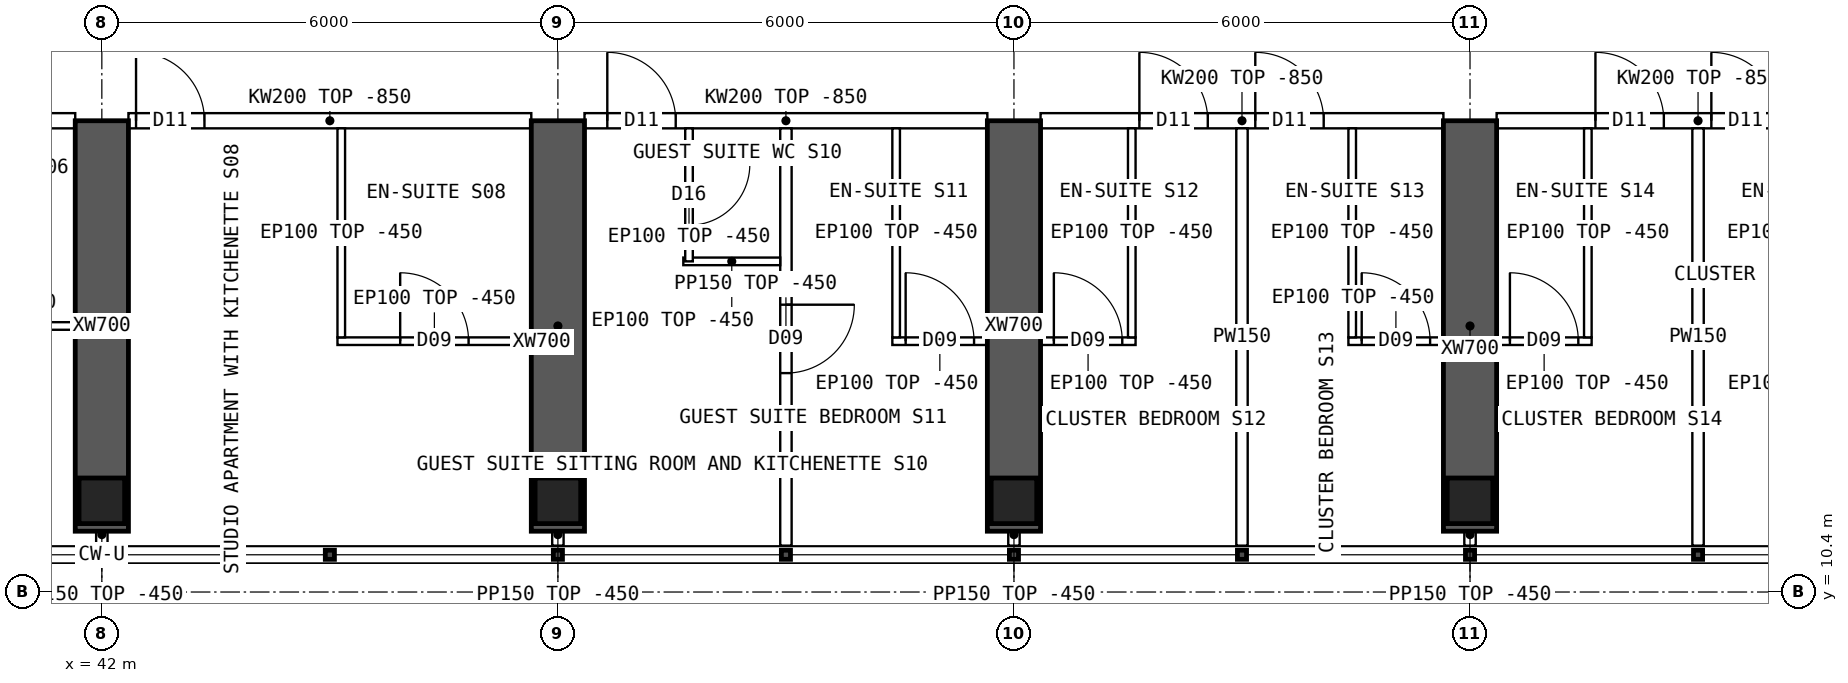
"""IFC4 building model, lengths in metres.
Left out: names, types, materials, properties, quantities, classifications, styles, units other than length and angle.
Written with IfcOpenShell. Run it as: python <this file> out.ifc"""

import sys

from ifc_helpers import new_model, si_unit, direction, frame, frame_2d, origin, origin_2d, place, context, subcontext, project, spatial, polyline, rectangle, hollow_rectangle, outline, extrude, element, fill, save


model = new_model("IFC4")
c1 = context("Model", 3, precision=1e-05, world=origin(), true_north=direction((0.0, 1.0)))
c2 = subcontext(c1, "Body", "Model", "MODEL_VIEW")
j1 = project(units=[si_unit("LENGTHUNIT", "METRE"), si_unit("PLANEANGLEUNIT", "RADIAN")], contexts=[c1])
p1 = place(None, origin())
s1 = spatial("IfcSite", under=j1, at=p1, CompositionType="ELEMENT")
p2 = place(p1, origin())
s2 = spatial("IfcBuilding", under=s1, at=p2, CompositionType="ELEMENT")
p3 = place(p2, frame((0.0, 0.0, 242.8)))
s3 = spatial("IfcBuildingStorey", under=s2, at=p3, CompositionType="ELEMENT", Elevation=242.8)
for number, where, z_axis, x_axis in (
    (1, (42.0, 11.6, 0.0), (0.0, 0.0, 1.0), (1.0, 0.0, 0.0)),
    (2, (48.0, 11.6, 0.0), (0.0, 0.0, 1.0), (1.0, 0.0, 0.0)),
    (3, (54.0, 11.6, 0.0), (0.0, 0.0, 1.0), (1.0, 0.0, 0.0)),
    (4, (60.0, 11.6, 0.0), (0.0, 0.0, 1.0), (1.0, 0.0, 0.0)),
):
    element("IfcColumn", number, at=place(p3, frame(where, z_axis=z_axis, x_axis=x_axis)), inside=s3, PredefinedType="COLUMN", context=c2, shape_type="SweptSolid", body=[
        extrude(hollow_rectangle(XDim=0.6, YDim=0.6, WallThickness=0.06, at=origin_2d()), origin(), (0.0, 0.0, 1.0), 3.75),
    ])
for number, where, z_axis, x_axis in (
    (5, (42.0, 11.2, 0.0), (0.0, 0.0, 1.0), (0.0, 1.0, 0.0)),
    (6, (48.0, 11.2, 0.0), (0.0, 0.0, 1.0), (0.0, 1.0, 0.0)),
    (7, (54.0, 11.2, 0.0), (0.0, 0.0, 1.0), (0.0, 1.0, 0.0)),
    (8, (60.0, 11.2, 0.0), (0.0, 0.0, 1.0), (0.0, 1.0, 0.0)),
):
    element("IfcWall", number, at=place(p3, frame(where, z_axis=z_axis, x_axis=x_axis)), inside=s3, PredefinedType="SHEAR", context=c2, shape_type="SweptSolid", body=[
        extrude(rectangle(XDim=5.4, YDim=0.7, at=frame_2d((2.7, 0.0))), origin(), (0.0, 0.0, 1.0), 3.75),
    ])
p4 = place(p3, frame((36.35, 16.6, 0.0), z_axis=(0.0, 0.0, 1.0), x_axis=(1.0, 0.0, 0.0)))
e9 = element("IfcWall", 9, at=p4, inside=s3, PredefinedType="SOLIDWALL", context=c2, shape_type="SweptSolid", body=[
    extrude(outline(polyline([(0.0, 0.0), (5.3, 0.0), (5.3, 2.9), (0.0, 2.9), (0.0, 0.0)])), frame((0.0, 0.1, 0.0), z_axis=(0.0, -1.0, 0.0), x_axis=(1.0, 0.0, 0.0)), (0.0, 0.0, 1.0), 0.2),
])
p5 = place(p4, frame((0.3, 0.0, 0.0)))
e10 = element("IfcOpeningElement", 10, at=p5, cuts=e9, PredefinedType="OPENING", context=c2, shape_type="SweptSolid", body=[
    extrude(rectangle(XDim=1.0, YDim=2.1, at=frame_2d((0.5, 1.05))), frame((0.0, 0.11, 0.0), z_axis=(0.0, -1.0, 0.0), x_axis=(1.0, 0.0, 0.0)), (0.0, 0.0, 1.0), 0.22),
])
p6 = place(p3, frame((42.35, 16.6, 0.0), z_axis=(0.0, 0.0, 1.0), x_axis=(1.0, 0.0, 0.0)))
e11 = element("IfcWall", 11, at=p6, inside=s3, PredefinedType="SOLIDWALL", context=c2, shape_type="SweptSolid", body=[
    extrude(outline(polyline([(0.0, 0.0), (5.3, 0.0), (5.3, 2.9), (0.0, 2.9), (0.0, 0.0)])), frame((0.0, 0.1, 0.0), z_axis=(0.0, -1.0, 0.0), x_axis=(1.0, 0.0, 0.0)), (0.0, 0.0, 1.0), 0.2),
])
p7 = place(p6, frame((0.1, 0.0, 0.0)))
e12 = element("IfcOpeningElement", 12, at=p7, cuts=e11, PredefinedType="OPENING", context=c2, shape_type="SweptSolid", body=[
    extrude(rectangle(XDim=0.9, YDim=2.1, at=frame_2d((0.45, 1.05))), frame((0.0, 0.11, 0.0), z_axis=(0.0, -1.0, 0.0), x_axis=(1.0, 0.0, 0.0)), (0.0, 0.0, 1.0), 0.22),
])
p8 = place(p3, frame((48.35, 16.6, 0.0), z_axis=(0.0, 0.0, 1.0), x_axis=(1.0, 0.0, 0.0)))
e13 = element("IfcWall", 13, at=p8, inside=s3, PredefinedType="SOLIDWALL", context=c2, shape_type="SweptSolid", body=[
    extrude(outline(polyline([(0.0, 0.0), (5.3, 0.0), (5.3, 2.9), (0.0, 2.9), (0.0, 0.0)])), frame((0.0, 0.1, 0.0), z_axis=(0.0, -1.0, 0.0), x_axis=(1.0, 0.0, 0.0)), (0.0, 0.0, 1.0), 0.2),
])
p9 = place(p8, frame((0.3, 0.0, 0.0)))
e14 = element("IfcOpeningElement", 14, at=p9, cuts=e13, PredefinedType="OPENING", context=c2, shape_type="SweptSolid", body=[
    extrude(rectangle(XDim=0.9, YDim=2.1, at=frame_2d((0.45, 1.05))), frame((0.0, 0.11, 0.0), z_axis=(0.0, -1.0, 0.0), x_axis=(1.0, 0.0, 0.0)), (0.0, 0.0, 1.0), 0.22),
])
p10 = place(p3, frame((54.35, 16.6, 0.0), z_axis=(0.0, 0.0, 1.0), x_axis=(1.0, 0.0, 0.0)))
e15 = element("IfcWall", 15, at=p10, inside=s3, PredefinedType="SOLIDWALL", context=c2, shape_type="SweptSolid", body=[
    extrude(outline(polyline([(0.0, 0.0), (5.3, 0.0), (5.3, 2.9), (0.0, 2.9), (0.0, 0.0)])), frame((0.0, 0.1, 0.0), z_axis=(0.0, -1.0, 0.0), x_axis=(1.0, 0.0, 0.0)), (0.0, 0.0, 1.0), 0.2),
])
p11 = place(p10, frame((1.3, 0.0, 0.0)))
e16 = element("IfcOpeningElement", 16, at=p11, cuts=e15, PredefinedType="OPENING", context=c2, shape_type="SweptSolid", body=[
    extrude(rectangle(XDim=0.9, YDim=2.1, at=frame_2d((0.45, 1.05))), frame((0.0, 0.11, 0.0), z_axis=(0.0, -1.0, 0.0), x_axis=(1.0, 0.0, 0.0)), (0.0, 0.0, 1.0), 0.22),
])
p12 = place(p10, frame((2.825, 0.0, 0.0)))
e17 = element("IfcOpeningElement", 17, at=p12, cuts=e15, PredefinedType="OPENING", context=c2, shape_type="SweptSolid", body=[
    extrude(rectangle(XDim=0.9, YDim=2.1, at=frame_2d((0.45, 1.05))), frame((0.0, 0.11, 0.0), z_axis=(0.0, -1.0, 0.0), x_axis=(1.0, 0.0, 0.0)), (0.0, 0.0, 1.0), 0.22),
])
p13 = place(p3, frame((60.35, 16.6, 0.0), z_axis=(0.0, 0.0, 1.0), x_axis=(1.0, 0.0, 0.0)))
e18 = element("IfcWall", 18, at=p13, inside=s3, PredefinedType="SOLIDWALL", context=c2, shape_type="SweptSolid", body=[
    extrude(outline(polyline([(0.0, 0.0), (5.3, 0.0), (5.3, 2.9), (0.0, 2.9), (0.0, 0.0)])), frame((0.0, 0.1, 0.0), z_axis=(0.0, -1.0, 0.0), x_axis=(1.0, 0.0, 0.0)), (0.0, 0.0, 1.0), 0.2),
])
p14 = place(p13, frame((1.3, 0.0, 0.0)))
e19 = element("IfcOpeningElement", 19, at=p14, cuts=e18, PredefinedType="OPENING", context=c2, shape_type="SweptSolid", body=[
    extrude(rectangle(XDim=0.9, YDim=2.1, at=frame_2d((0.45, 1.05))), frame((0.0, 0.11, 0.0), z_axis=(0.0, -1.0, 0.0), x_axis=(1.0, 0.0, 0.0)), (0.0, 0.0, 1.0), 0.22),
])
p15 = place(p13, frame((2.825, 0.0, 0.0)))
e20 = element("IfcOpeningElement", 20, at=p15, cuts=e18, PredefinedType="OPENING", context=c2, shape_type="SweptSolid", body=[
    extrude(rectangle(XDim=0.9, YDim=2.1, at=frame_2d((0.45, 1.05))), frame((0.0, 0.11, 0.0), z_axis=(0.0, -1.0, 0.0), x_axis=(1.0, 0.0, 0.0)), (0.0, 0.0, 1.0), 0.22),
])
p16 = place(p3, frame((39.0, 13.9, 0.0), z_axis=(0.0, 0.0, 1.0), x_axis=(1.0, 0.0, 0.0)))
e21 = element("IfcWall", 21, at=p16, inside=s3, PredefinedType="PARTITIONING", context=c2, shape_type="SweptSolid", body=[
    extrude(rectangle(XDim=2.65, YDim=0.1, at=frame_2d((1.325, 0.0))), origin(), (0.0, 0.0, 1.0), 3.3),
])
p17 = place(p3, frame((47.65, 13.7, 0.0), z_axis=(0.0, 0.0, 1.0), x_axis=(-1.0, 0.0, 0.0)))
e22 = element("IfcWall", 22, at=p17, inside=s3, PredefinedType="PARTITIONING", context=c2, shape_type="SweptSolid", body=[
    extrude(rectangle(XDim=2.55, YDim=0.1, at=frame_2d((1.275, 0.0))), origin(), (0.0, 0.0, 1.0), 3.3),
])
p18 = place(p17, frame((0.825, 0.0, 0.0)))
e23 = element("IfcOpeningElement", 23, at=p18, cuts=e22, PredefinedType="OPENING", context=c2, shape_type="SweptSolid", body=[
    extrude(rectangle(XDim=0.9, YDim=2.1, at=frame_2d((0.45, 1.05))), frame((0.0, 0.06, 0.0), z_axis=(0.0, -1.0, 0.0), x_axis=(1.0, 0.0, 0.0)), (0.0, 0.0, 1.0), 0.12),
])
p19 = place(p3, frame((45.15, 13.75, 0.0), z_axis=(0.0, 0.0, 1.0), x_axis=(0.0, 1.0, 0.0)))
e24 = element("IfcWall", 24, at=p19, inside=s3, PredefinedType="PARTITIONING", context=c2, shape_type="SweptSolid", body=[
    extrude(outline(polyline([(0.0, 0.0), (2.75, 0.0), (2.75, 2.9), (2.702, 2.9), (2.7, 3.3), (0.0, 3.3), (0.0, 0.0)])), frame((0.0, 0.05, 0.0), z_axis=(0.0, -1.0, 0.0), x_axis=(1.0, 0.0, 0.0)), (0.0, 0.0, 1.0), 0.1),
])
p20 = place(p3, frame((51.0, 11.01, 0.0), z_axis=(0.0, 0.0, 1.0), x_axis=(0.0, 1.0, 0.0)))
e25 = element("IfcWall", 25, at=p20, inside=s3, PredefinedType="PARTITIONING", context=c2, shape_type="SweptSolid", body=[
    extrude(outline(polyline([(0.0, 0.0), (5.49, 0.0), (5.49, 2.9), (5.442, 2.9), (5.44, 3.3), (0.792, 3.3), (0.79, 2.9), (0.392, 2.9), (0.39, 3.3), (0.0, 3.3), (0.0, 0.0)])), frame((0.0, 0.075, 0.0), z_axis=(0.0, -1.0, 0.0), x_axis=(1.0, 0.0, 0.0)), (0.0, 0.0, 1.0), 0.15),
])
p21 = place(p20, frame((2.27, 0.0, 0.0)))
e26 = element("IfcOpeningElement", 26, at=p21, cuts=e25, PredefinedType="OPENING", context=c2, shape_type="SweptSolid", body=[
    extrude(rectangle(XDim=0.9, YDim=2.1, at=frame_2d((0.45, 1.05))), frame((0.0, 0.085, 0.0), z_axis=(0.0, -1.0, 0.0), x_axis=(1.0, 0.0, 0.0)), (0.0, 0.0, 1.0), 0.17),
])
p22 = place(p3, frame((53.65, 13.7, 0.0), z_axis=(0.0, 0.0, 1.0), x_axis=(-1.0, 0.0, 0.0)))
e27 = element("IfcWall", 27, at=p22, inside=s3, PredefinedType="PARTITIONING", context=c2, shape_type="SweptSolid", body=[
    extrude(rectangle(XDim=1.25, YDim=0.1, at=frame_2d((0.625, 0.0))), origin(), (0.0, 0.0, 1.0), 3.3),
])
p23 = place(p22, frame((0.175, 0.0, 0.0)))
e28 = element("IfcOpeningElement", 28, at=p23, cuts=e27, PredefinedType="OPENING", context=c2, shape_type="SweptSolid", body=[
    extrude(rectangle(XDim=0.9, YDim=2.1, at=frame_2d((0.45, 1.05))), frame((0.0, 0.06, 0.0), z_axis=(0.0, -1.0, 0.0), x_axis=(1.0, 0.0, 0.0)), (0.0, 0.0, 1.0), 0.12),
])
p24 = place(p3, frame((52.45, 13.75, 0.0), z_axis=(0.0, 0.0, 1.0), x_axis=(0.0, 1.0, 0.0)))
e29 = element("IfcWall", 29, at=p24, inside=s3, PredefinedType="PARTITIONING", context=c2, shape_type="SweptSolid", body=[
    extrude(outline(polyline([(0.0, 0.0), (2.75, 0.0), (2.75, 2.9), (2.702, 2.9), (2.7, 3.3), (0.0, 3.3), (0.0, 0.0)])), frame((0.0, 0.05, 0.0), z_axis=(0.0, -1.0, 0.0), x_axis=(1.0, 0.0, 0.0)), (0.0, 0.0, 1.0), 0.1),
])
p25 = place(p3, frame((49.65, 14.75, 0.0), z_axis=(0.0, 0.0, 1.0), x_axis=(1.0, 0.0, 0.0)))
e30 = element("IfcWall", 30, at=p25, inside=s3, PredefinedType="PARTITIONING", context=c2, shape_type="SweptSolid", body=[
    extrude(rectangle(XDim=1.275, YDim=0.1, at=frame_2d((0.638, 0.0))), origin(), (0.0, 0.0, 1.0), 3.3),
])
p26 = place(p3, frame((49.725, 14.75, 0.0), z_axis=(0.0, 0.0, 1.0), x_axis=(0.0, 1.0, 0.0)))
e31 = element("IfcWall", 31, at=p26, inside=s3, PredefinedType="PARTITIONING", context=c2, shape_type="SweptSolid", body=[
    extrude(outline(polyline([(0.0, 0.0), (1.75, 0.0), (1.75, 2.9), (1.702, 2.9), (1.7, 3.3), (0.0, 3.3), (0.0, 0.0)])), frame((0.0, 0.05, 0.0), z_axis=(0.0, -1.0, 0.0), x_axis=(1.0, 0.0, 0.0)), (0.0, 0.0, 1.0), 0.1),
])
p27 = place(p26, frame((0.475, 0.0, 0.0)))
e32 = element("IfcOpeningElement", 32, at=p27, cuts=e31, PredefinedType="OPENING", context=c2, shape_type="SweptSolid", body=[
    extrude(rectangle(XDim=0.8, YDim=2.1, at=frame_2d((0.4, 1.05))), frame((0.0, 0.06, 0.0), z_axis=(0.0, -1.0, 0.0), x_axis=(1.0, 0.0, 0.0)), (0.0, 0.0, 1.0), 0.12),
])
p28 = place(p3, frame((57.0, 11.01, 0.0), z_axis=(0.0, 0.0, 1.0), x_axis=(0.0, 1.0, 0.0)))
e33 = element("IfcWall", 33, at=p28, inside=s3, PredefinedType="PARTITIONING", context=c2, shape_type="SweptSolid", body=[
    extrude(outline(polyline([(0.0, 0.0), (5.49, 0.0), (5.49, 2.9), (5.442, 2.9), (5.44, 3.3), (0.792, 3.3), (0.79, 2.9), (0.392, 2.9), (0.39, 3.3), (0.0, 3.3), (0.0, 0.0)])), frame((0.0, 0.075, 0.0), z_axis=(0.0, -1.0, 0.0), x_axis=(1.0, 0.0, 0.0)), (0.0, 0.0, 1.0), 0.15),
])
p29 = place(p3, frame((55.6, 13.7, 0.0), z_axis=(0.0, 0.0, 1.0), x_axis=(-1.0, 0.0, 0.0)))
e34 = element("IfcWall", 34, at=p29, inside=s3, PredefinedType="PARTITIONING", context=c2, shape_type="SweptSolid", body=[
    extrude(rectangle(XDim=1.25, YDim=0.1, at=frame_2d((0.625, 0.0))), origin(), (0.0, 0.0, 1.0), 3.3),
])
p30 = place(p29, frame((0.175, 0.0, 0.0)))
e35 = element("IfcOpeningElement", 35, at=p30, cuts=e34, PredefinedType="OPENING", context=c2, shape_type="SweptSolid", body=[
    extrude(rectangle(XDim=0.9, YDim=2.1, at=frame_2d((0.45, 1.05))), frame((0.0, 0.06, 0.0), z_axis=(0.0, -1.0, 0.0), x_axis=(1.0, 0.0, 0.0)), (0.0, 0.0, 1.0), 0.12),
])
p31 = place(p3, frame((55.55, 13.75, 0.0), z_axis=(0.0, 0.0, 1.0), x_axis=(0.0, 1.0, 0.0)))
e36 = element("IfcWall", 36, at=p31, inside=s3, PredefinedType="PARTITIONING", context=c2, shape_type="SweptSolid", body=[
    extrude(outline(polyline([(0.0, 0.0), (2.75, 0.0), (2.75, 2.9), (2.702, 2.9), (2.7, 3.3), (0.0, 3.3), (0.0, 0.0)])), frame((0.0, 0.05, 0.0), z_axis=(0.0, -1.0, 0.0), x_axis=(1.0, 0.0, 0.0)), (0.0, 0.0, 1.0), 0.1),
])
p32 = place(p3, frame((59.65, 13.7, 0.0), z_axis=(0.0, 0.0, 1.0), x_axis=(-1.0, 0.0, 0.0)))
e37 = element("IfcWall", 37, at=p32, inside=s3, PredefinedType="PARTITIONING", context=c2, shape_type="SweptSolid", body=[
    extrude(rectangle(XDim=1.25, YDim=0.1, at=frame_2d((0.625, 0.0))), origin(), (0.0, 0.0, 1.0), 3.3),
])
p33 = place(p32, frame((0.175, 0.0, 0.0)))
e38 = element("IfcOpeningElement", 38, at=p33, cuts=e37, PredefinedType="OPENING", context=c2, shape_type="SweptSolid", body=[
    extrude(rectangle(XDim=0.9, YDim=2.1, at=frame_2d((0.45, 1.05))), frame((0.0, 0.06, 0.0), z_axis=(0.0, -1.0, 0.0), x_axis=(1.0, 0.0, 0.0)), (0.0, 0.0, 1.0), 0.12),
])
p34 = place(p3, frame((58.45, 13.75, 0.0), z_axis=(0.0, 0.0, 1.0), x_axis=(0.0, 1.0, 0.0)))
e39 = element("IfcWall", 39, at=p34, inside=s3, PredefinedType="PARTITIONING", context=c2, shape_type="SweptSolid", body=[
    extrude(outline(polyline([(0.0, 0.0), (2.75, 0.0), (2.75, 2.9), (2.702, 2.9), (2.7, 3.3), (0.0, 3.3), (0.0, 0.0)])), frame((0.0, 0.05, 0.0), z_axis=(0.0, -1.0, 0.0), x_axis=(1.0, 0.0, 0.0)), (0.0, 0.0, 1.0), 0.1),
])
p35 = place(p3, frame((63.0, 11.01, 0.0), z_axis=(0.0, 0.0, 1.0), x_axis=(0.0, 1.0, 0.0)))
e40 = element("IfcWall", 40, at=p35, inside=s3, PredefinedType="PARTITIONING", context=c2, shape_type="SweptSolid", body=[
    extrude(outline(polyline([(0.0, 0.0), (5.49, 0.0), (5.49, 2.9), (5.442, 2.9), (5.44, 3.3), (0.792, 3.3), (0.79, 2.9), (0.392, 2.9), (0.39, 3.3), (0.0, 3.3), (0.0, 0.0)])), frame((0.0, 0.075, 0.0), z_axis=(0.0, -1.0, 0.0), x_axis=(1.0, 0.0, 0.0)), (0.0, 0.0, 1.0), 0.15),
])
p36 = place(p3, frame((61.6, 13.7, 0.0), z_axis=(0.0, 0.0, 1.0), x_axis=(-1.0, 0.0, 0.0)))
e41 = element("IfcWall", 41, at=p36, inside=s3, PredefinedType="PARTITIONING", context=c2, shape_type="SweptSolid", body=[
    extrude(rectangle(XDim=1.25, YDim=0.1, at=frame_2d((0.625, 0.0))), origin(), (0.0, 0.0, 1.0), 3.3),
])
p37 = place(p36, frame((0.175, 0.0, 0.0)))
e42 = element("IfcOpeningElement", 42, at=p37, cuts=e41, PredefinedType="OPENING", context=c2, shape_type="SweptSolid", body=[
    extrude(rectangle(XDim=0.9, YDim=2.1, at=frame_2d((0.45, 1.05))), frame((0.0, 0.06, 0.0), z_axis=(0.0, -1.0, 0.0), x_axis=(1.0, 0.0, 0.0)), (0.0, 0.0, 1.0), 0.12),
])
p38 = place(p3, frame((61.55, 13.75, 0.0), z_axis=(0.0, 0.0, 1.0), x_axis=(0.0, 1.0, 0.0)))
e43 = element("IfcWall", 43, at=p38, inside=s3, PredefinedType="PARTITIONING", context=c2, shape_type="SweptSolid", body=[
    extrude(outline(polyline([(0.0, 0.0), (2.75, 0.0), (2.75, 2.9), (2.702, 2.9), (2.7, 3.3), (0.0, 3.3), (0.0, 0.0)])), frame((0.0, 0.05, 0.0), z_axis=(0.0, -1.0, 0.0), x_axis=(1.0, 0.0, 0.0)), (0.0, 0.0, 1.0), 0.1),
])
for number, where, z_axis, x_axis in (
    (44, (42.0, 11.3, 0.0), (0.0, 0.0, 1.0), (0.0, -1.0, 0.0)),
    (45, (48.0, 11.3, 0.0), (0.0, 0.0, 1.0), (0.0, -1.0, 0.0)),
    (46, (54.0, 11.3, 0.0), (0.0, 0.0, 1.0), (0.0, -1.0, 0.0)),
    (47, (60.0, 11.3, 0.0), (0.0, 0.0, 1.0), (0.0, -1.0, 0.0)),
):
    element("IfcWall", number, at=place(p3, frame(where, z_axis=z_axis, x_axis=x_axis)), inside=s3, PredefinedType="PARTITIONING", context=c2, shape_type="SweptSolid", body=[
        extrude(rectangle(XDim=0.29, YDim=0.15, at=frame_2d((0.145, 0.0))), origin(), (0.0, 0.0, 1.0), 3.3),
    ])
p39 = place(p18, origin())
e48 = element("IfcDoor", 48, at=p39, inside=s3, OperationType="SINGLE_SWING_RIGHT", PredefinedType="DOOR", context=c2, shape_type="SweptSolid", body=[
    extrude(rectangle(XDim=0.9, YDim=2.1, at=frame_2d((0.45, 1.05))), frame((0.0, 0.025, 0.0), z_axis=(0.0, -1.0, 0.0), x_axis=(1.0, 0.0, 0.0)), (0.0, 0.0, 1.0), 0.05),
])
fill(e23, e48)
p40 = place(p7, origin())
e49 = element("IfcDoor", 49, at=p40, inside=s3, OperationType="SINGLE_SWING_LEFT", PredefinedType="DOOR", context=c2, shape_type="SweptSolid", body=[
    extrude(rectangle(XDim=0.9, YDim=2.1, at=frame_2d((0.45, 1.05))), frame((0.0, 0.025, 0.0), z_axis=(0.0, -1.0, 0.0), x_axis=(1.0, 0.0, 0.0)), (0.0, 0.0, 1.0), 0.05),
])
fill(e12, e49)
p41 = place(p9, origin())
e50 = element("IfcDoor", 50, at=p41, inside=s3, OperationType="SINGLE_SWING_LEFT", PredefinedType="DOOR", context=c2, shape_type="SweptSolid", body=[
    extrude(rectangle(XDim=0.9, YDim=2.1, at=frame_2d((0.45, 1.05))), frame((0.0, 0.025, 0.0), z_axis=(0.0, -1.0, 0.0), x_axis=(1.0, 0.0, 0.0)), (0.0, 0.0, 1.0), 0.05),
])
fill(e14, e50)
p42 = place(p23, origin())
e51 = element("IfcDoor", 51, at=p42, inside=s3, OperationType="SINGLE_SWING_RIGHT", PredefinedType="DOOR", context=c2, shape_type="SweptSolid", body=[
    extrude(rectangle(XDim=0.9, YDim=2.1, at=frame_2d((0.45, 1.05))), frame((0.0, 0.025, 0.0), z_axis=(0.0, -1.0, 0.0), x_axis=(1.0, 0.0, 0.0)), (0.0, 0.0, 1.0), 0.05),
])
fill(e28, e51)
p43 = place(p21, origin())
e52 = element("IfcDoor", 52, at=p43, inside=s3, OperationType="SINGLE_SWING_RIGHT", PredefinedType="DOOR", context=c2, shape_type="SweptSolid", body=[
    extrude(rectangle(XDim=0.9, YDim=2.1, at=frame_2d((0.45, 1.05))), frame((0.0, 0.025, 0.0), z_axis=(0.0, -1.0, 0.0), x_axis=(1.0, 0.0, 0.0)), (0.0, 0.0, 1.0), 0.05),
])
fill(e26, e52)
p44 = place(p27, origin())
e53 = element("IfcDoor", 53, at=p44, inside=s3, OperationType="SINGLE_SWING_RIGHT", PredefinedType="DOOR", context=c2, shape_type="SweptSolid", body=[
    extrude(rectangle(XDim=0.8, YDim=2.1, at=frame_2d((0.4, 1.05))), frame((0.0, 0.025, 0.0), z_axis=(0.0, -1.0, 0.0), x_axis=(1.0, 0.0, 0.0)), (0.0, 0.0, 1.0), 0.05),
])
fill(e32, e53)
p45 = place(p30, origin())
e54 = element("IfcDoor", 54, at=p45, inside=s3, OperationType="SINGLE_SWING_RIGHT", PredefinedType="DOOR", context=c2, shape_type="SweptSolid", body=[
    extrude(rectangle(XDim=0.9, YDim=2.1, at=frame_2d((0.45, 1.05))), frame((0.0, 0.025, 0.0), z_axis=(0.0, -1.0, 0.0), x_axis=(1.0, 0.0, 0.0)), (0.0, 0.0, 1.0), 0.05),
])
fill(e35, e54)
p46 = place(p11, origin())
e55 = element("IfcDoor", 55, at=p46, inside=s3, OperationType="SINGLE_SWING_LEFT", PredefinedType="DOOR", context=c2, shape_type="SweptSolid", body=[
    extrude(rectangle(XDim=0.9, YDim=2.1, at=frame_2d((0.45, 1.05))), frame((0.0, 0.025, 0.0), z_axis=(0.0, -1.0, 0.0), x_axis=(1.0, 0.0, 0.0)), (0.0, 0.0, 1.0), 0.05),
])
fill(e16, e55)
p47 = place(p33, origin())
e56 = element("IfcDoor", 56, at=p47, inside=s3, OperationType="SINGLE_SWING_RIGHT", PredefinedType="DOOR", context=c2, shape_type="SweptSolid", body=[
    extrude(rectangle(XDim=0.9, YDim=2.1, at=frame_2d((0.45, 1.05))), frame((0.0, 0.025, 0.0), z_axis=(0.0, -1.0, 0.0), x_axis=(1.0, 0.0, 0.0)), (0.0, 0.0, 1.0), 0.05),
])
fill(e38, e56)
p48 = place(p12, origin())
e57 = element("IfcDoor", 57, at=p48, inside=s3, OperationType="SINGLE_SWING_LEFT", PredefinedType="DOOR", context=c2, shape_type="SweptSolid", body=[
    extrude(rectangle(XDim=0.9, YDim=2.1, at=frame_2d((0.45, 1.05))), frame((0.0, 0.025, 0.0), z_axis=(0.0, -1.0, 0.0), x_axis=(1.0, 0.0, 0.0)), (0.0, 0.0, 1.0), 0.05),
])
fill(e17, e57)
p49 = place(p37, origin())
e58 = element("IfcDoor", 58, at=p49, inside=s3, OperationType="SINGLE_SWING_RIGHT", PredefinedType="DOOR", context=c2, shape_type="SweptSolid", body=[
    extrude(rectangle(XDim=0.9, YDim=2.1, at=frame_2d((0.45, 1.05))), frame((0.0, 0.025, 0.0), z_axis=(0.0, -1.0, 0.0), x_axis=(1.0, 0.0, 0.0)), (0.0, 0.0, 1.0), 0.05),
])
fill(e42, e58)
p50 = place(p14, origin())
e59 = element("IfcDoor", 59, at=p50, inside=s3, OperationType="SINGLE_SWING_LEFT", PredefinedType="DOOR", context=c2, shape_type="SweptSolid", body=[
    extrude(rectangle(XDim=0.9, YDim=2.1, at=frame_2d((0.45, 1.05))), frame((0.0, 0.025, 0.0), z_axis=(0.0, -1.0, 0.0), x_axis=(1.0, 0.0, 0.0)), (0.0, 0.0, 1.0), 0.05),
])
fill(e19, e59)
p51 = place(p15, origin())
e60 = element("IfcDoor", 60, at=p51, inside=s3, OperationType="SINGLE_SWING_LEFT", PredefinedType="DOOR", context=c2, shape_type="SweptSolid", body=[
    extrude(rectangle(XDim=0.9, YDim=2.1, at=frame_2d((0.45, 1.05))), frame((0.0, 0.025, 0.0), z_axis=(0.0, -1.0, 0.0), x_axis=(1.0, 0.0, 0.0)), (0.0, 0.0, 1.0), 0.05),
])
fill(e20, e60)
save(model, sys.argv[1])
